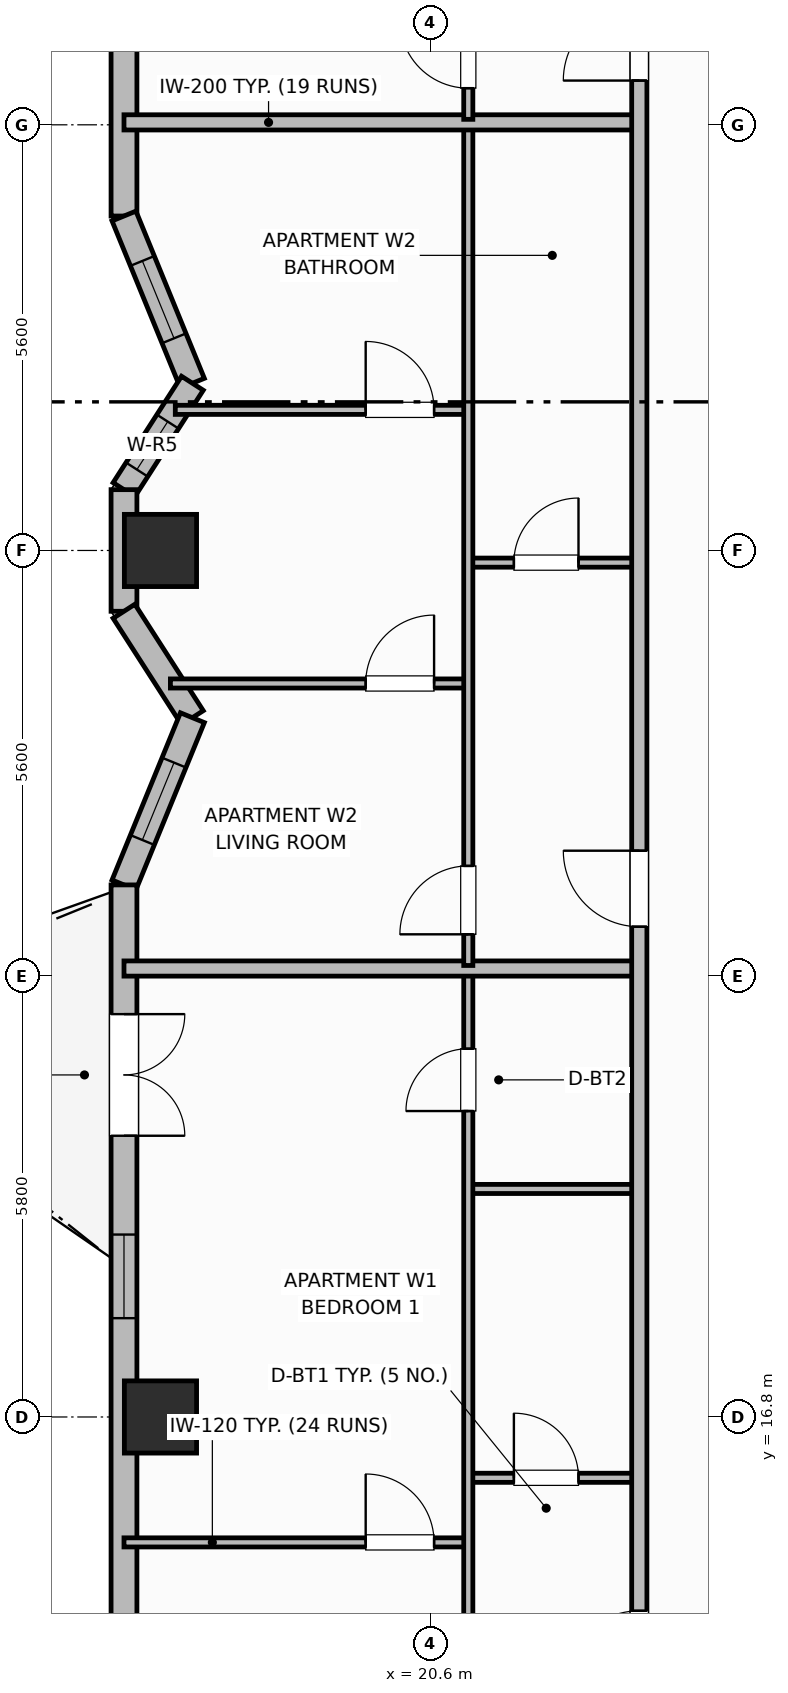
"""IFC4 building model, lengths in metres.
Left out: names, types, materials, properties, quantities, classifications, styles, units other than length and angle.
Written with IfcOpenShell. Run it as: python <this file> out.ifc"""

import sys

from ifc_helpers import new_model, si_unit, direction, frame, frame_2d, origin, origin_2d, place, context, subcontext, project, spatial, rectangle, extrude, element, fill, save


model = new_model("IFC4")
c1 = context("Model", 3, precision=1e-05, world=origin(), true_north=direction((0.0, 1.0)))
c2 = subcontext(c1, "Body", "Model", "MODEL_VIEW")
j1 = project(units=[si_unit("LENGTHUNIT", "METRE"), si_unit("PLANEANGLEUNIT", "RADIAN")], contexts=[c1])
p1 = place(None, origin())
s1 = spatial("IfcSite", under=j1, at=p1, CompositionType="ELEMENT")
p2 = place(p1, origin())
s2 = spatial("IfcBuilding", under=s1, at=p2, CompositionType="ELEMENT")
p3 = place(p2, frame((0.0, 0.0, 155.2)))
s3 = spatial("IfcBuildingStorey", under=s2, at=p3, CompositionType="ELEMENT", Elevation=155.2)
for number, where, z_axis, x_axis in (
    (1, (17.05, 16.8, 0.0), (0.0, 0.0, 1.0), (1.0, 0.0, 0.0)),
    (2, (17.05, 28.2, 0.0), (0.0, 0.0, 1.0), (1.0, 0.0, 0.0)),
):
    element("IfcColumn", number, at=place(p3, frame(where, z_axis=z_axis, x_axis=x_axis)), inside=s3, PredefinedType="COLUMN", context=c2, shape_type="SweptSolid", body=[
        extrude(rectangle(XDim=0.95, YDim=0.95, at=origin_2d()), origin(), (0.0, 0.0, 1.0), 3.7),
    ])
p4 = place(p3, frame((16.57, 45.9, 0.0), z_axis=(0.0, 0.0, 1.0), x_axis=(0.0, -1.0, 0.0)))
e3 = element("IfcWall", 3, at=p4, inside=s3, PredefinedType="SOLIDWALL", context=c2, shape_type="SweptSolid", body=[
    extrude(rectangle(XDim=13.3, YDim=0.34, at=frame_2d((6.65, 0.0))), origin(), (0.0, 0.0, 1.0), 2.72),
])
p5 = place(p4, frame((1.45, 0.0, 0.75)))
e4 = element("IfcOpeningElement", 4, at=p5, cuts=e3, PredefinedType="OPENING", context=c2, shape_type="SweptSolid", body=[
    extrude(rectangle(XDim=1.4, YDim=1.85, at=frame_2d((0.7, 0.925))), frame((0.0, 0.18, 0.0), z_axis=(0.0, -1.0, 0.0), x_axis=(1.0, 0.0, 0.0)), (0.0, 0.0, 1.0), 0.36),
])
p6 = place(p4, frame((4.36, 0.0, 0.71)))
e5 = element("IfcOpeningElement", 5, at=p6, cuts=e3, PredefinedType="OPENING", context=c2, shape_type="SweptSolid", body=[
    extrude(rectangle(XDim=1.4, YDim=1.85, at=frame_2d((0.7, 0.925))), frame((0.0, 0.18, 0.0), z_axis=(0.0, -1.0, 0.0), x_axis=(1.0, 0.0, 0.0)), (0.0, 0.0, 1.0), 0.36),
])
p7 = place(p4, frame((8.5, 0.0, 0.75)))
e6 = element("IfcOpeningElement", 6, at=p7, cuts=e3, PredefinedType="OPENING", context=c2, shape_type="SweptSolid", body=[
    extrude(rectangle(XDim=1.4, YDim=1.85, at=frame_2d((0.7, 0.925))), frame((0.0, 0.18, 0.0), z_axis=(0.0, -1.0, 0.0), x_axis=(1.0, 0.0, 0.0)), (0.0, 0.0, 1.0), 0.36),
])
p8 = place(p3, frame((16.57, 32.6, 0.0), z_axis=(0.0, 0.0, 1.0), x_axis=(0.378568858991, -0.925573130013, 0.0)))
e7 = element("IfcWall", 7, at=p8, inside=s3, PredefinedType="SOLIDWALL", context=c2, shape_type="SweptSolid", body=[
    extrude(rectangle(XDim=2.377, YDim=0.34, at=frame_2d((1.188, 0.0))), origin(), (0.0, 0.0, 1.0), 2.72),
])
p9 = place(p8, frame((0.638, 0.0, 0.91)))
e8 = element("IfcOpeningElement", 8, at=p9, cuts=e7, PredefinedType="OPENING", context=c2, shape_type="SweptSolid", body=[
    extrude(rectangle(XDim=1.1, YDim=1.65, at=frame_2d((0.55, 0.825))), frame((0.0, 0.18, 0.0), z_axis=(0.0, -1.0, 0.0), x_axis=(1.0, 0.0, 0.0)), (0.0, 0.0, 1.0), 0.36),
])
p10 = place(p3, frame((17.47, 30.4, 0.0), z_axis=(0.0, 0.0, 1.0), x_axis=(-0.540742762169, -0.841188008214, 0.0)))
e9 = element("IfcWall", 9, at=p10, inside=s3, PredefinedType="SOLIDWALL", context=c2, shape_type="SweptSolid", body=[
    extrude(rectangle(XDim=1.664, YDim=0.34, at=frame_2d((0.832, 0.0))), origin(), (0.0, 0.0, 1.0), 2.72),
])
p11 = place(p10, frame((0.6, 0.0, 0.91)))
e10 = element("IfcOpeningElement", 10, at=p11, cuts=e9, PredefinedType="OPENING", context=c2, shape_type="SweptSolid", body=[
    extrude(rectangle(XDim=0.75, YDim=1.65, at=frame_2d((0.375, 0.825))), frame((0.0, 0.18, 0.0), z_axis=(0.0, -1.0, 0.0), x_axis=(1.0, 0.0, 0.0)), (0.0, 0.0, 1.0), 0.36),
])
p12 = place(p3, frame((16.57, 29.0, 0.0), z_axis=(0.0, 0.0, 1.0), x_axis=(0.0, -1.0, 0.0)))
e11 = element("IfcWall", 11, at=p12, inside=s3, PredefinedType="SOLIDWALL", context=c2, shape_type="SweptSolid", body=[
    extrude(rectangle(XDim=1.6, YDim=0.34, at=frame_2d((0.8, 0.0))), origin(), (0.0, 0.0, 1.0), 2.72),
])
p13 = place(p3, frame((16.57, 27.4, 0.0), z_axis=(0.0, 0.0, 1.0), x_axis=(0.540742762169, -0.841188008214, 0.0)))
e12 = element("IfcWall", 12, at=p13, inside=s3, PredefinedType="SOLIDWALL", context=c2, shape_type="SweptSolid", body=[
    extrude(rectangle(XDim=1.664, YDim=0.34, at=frame_2d((0.832, 0.0))), origin(), (0.0, 0.0, 1.0), 2.72),
])
p14 = place(p3, frame((17.47, 26.0, 0.0), z_axis=(0.0, 0.0, 1.0), x_axis=(-0.378604849088, -0.925558408879, 0.0)))
e13 = element("IfcWall", 13, at=p14, inside=s3, PredefinedType="SOLIDWALL", context=c2, shape_type="SweptSolid", body=[
    extrude(rectangle(XDim=2.377, YDim=0.34, at=frame_2d((1.188, 0.0))), origin(), (0.0, 0.0, 1.0), 2.72),
])
p15 = place(p14, frame((0.638, 0.0, 0.91)))
e14 = element("IfcOpeningElement", 14, at=p15, cuts=e13, PredefinedType="OPENING", context=c2, shape_type="SweptSolid", body=[
    extrude(rectangle(XDim=1.1, YDim=1.65, at=frame_2d((0.55, 0.825))), frame((0.0, 0.18, 0.0), z_axis=(0.0, -1.0, 0.0), x_axis=(1.0, 0.0, 0.0)), (0.0, 0.0, 1.0), 0.36),
])
p16 = place(p3, frame((16.57, 23.8, 0.0), z_axis=(0.0, 0.0, 1.0), x_axis=(0.0, -1.0, 0.0)))
e15 = element("IfcWall", 15, at=p16, inside=s3, PredefinedType="SOLIDWALL", context=c2, shape_type="SweptSolid", body=[
    extrude(rectangle(XDim=13.3, YDim=0.34, at=frame_2d((6.65, 0.0))), origin(), (0.0, 0.0, 1.0), 2.72),
])
p17 = place(p16, frame((1.7, 0.0, 0.0)))
e16 = element("IfcOpeningElement", 16, at=p17, cuts=e15, PredefinedType="OPENING", context=c2, shape_type="SweptSolid", body=[
    extrude(rectangle(XDim=1.6, YDim=2.1, at=frame_2d((0.8, 1.05))), frame((0.0, 0.18, 0.0), z_axis=(0.0, -1.0, 0.0), x_axis=(1.0, 0.0, 0.0)), (0.0, 0.0, 1.0), 0.36),
])
p18 = place(p16, frame((4.6, 0.0, 0.95)))
e17 = element("IfcOpeningElement", 17, at=p18, cuts=e15, PredefinedType="OPENING", context=c2, shape_type="SweptSolid", body=[
    extrude(rectangle(XDim=1.1, YDim=1.65, at=frame_2d((0.55, 0.825))), frame((0.0, 0.18, 0.0), z_axis=(0.0, -1.0, 0.0), x_axis=(1.0, 0.0, 0.0)), (0.0, 0.0, 1.0), 0.36),
])
p19 = place(p16, frame((10.6, 0.0, 0.95)))
e18 = element("IfcOpeningElement", 18, at=p19, cuts=e15, PredefinedType="OPENING", context=c2, shape_type="SweptSolid", body=[
    extrude(rectangle(XDim=1.1, YDim=1.65, at=frame_2d((0.55, 0.825))), frame((0.0, 0.18, 0.0), z_axis=(0.0, -1.0, 0.0), x_axis=(1.0, 0.0, 0.0)), (0.0, 0.0, 1.0), 0.36),
])
p20 = place(p3, frame((21.1, 16.0, 0.0), z_axis=(0.0, 0.0, 1.0), x_axis=(1.0, 0.0, 0.0)))
e19 = element("IfcWall", 19, at=p20, inside=s3, PredefinedType="PARTITIONING", context=c2, shape_type="SweptSolid", body=[
    extrude(rectangle(XDim=2.25, YDim=0.12, at=frame_2d((1.125, 0.0))), origin(), (0.0, 0.0, 1.0), 2.55),
])
p21 = place(p20, frame((0.6, 0.0, 0.0)))
e20 = element("IfcOpeningElement", 20, at=p21, cuts=e19, PredefinedType="OPENING", context=c2, shape_type="SweptSolid", body=[
    extrude(rectangle(XDim=0.85, YDim=2.1, at=frame_2d((0.425, 1.05))), frame((0.0, 0.07, 0.0), z_axis=(0.0, -1.0, 0.0), x_axis=(1.0, 0.0, 0.0)), (0.0, 0.0, 1.0), 0.14),
])
p22 = place(p3, frame((21.1, 19.8, 0.0), z_axis=(0.0, 0.0, 1.0), x_axis=(1.0, 0.0, 0.0)))
e21 = element("IfcWall", 21, at=p22, inside=s3, PredefinedType="PARTITIONING", context=c2, shape_type="SweptSolid", body=[
    extrude(rectangle(XDim=2.25, YDim=0.12, at=frame_2d((1.125, 0.0))), origin(), (0.0, 0.0, 1.0), 2.55),
])
p23 = place(p3, frame((16.57, 15.15, 0.0), z_axis=(0.0, 0.0, 1.0), x_axis=(1.0, 0.0, 0.0)))
e22 = element("IfcWall", 22, at=p23, inside=s3, PredefinedType="PARTITIONING", context=c2, shape_type="SweptSolid", body=[
    extrude(rectangle(XDim=4.53, YDim=0.12, at=frame_2d((2.265, 0.0))), origin(), (0.0, 0.0, 1.0), 2.55),
])
p24 = place(p23, frame((3.18, 0.0, 0.0)))
e23 = element("IfcOpeningElement", 23, at=p24, cuts=e22, PredefinedType="OPENING", context=c2, shape_type="SweptSolid", body=[
    extrude(rectangle(XDim=0.9, YDim=2.1, at=frame_2d((0.45, 1.05))), frame((0.0, 0.07, 0.0), z_axis=(0.0, -1.0, 0.0), x_axis=(1.0, 0.0, 0.0)), (0.0, 0.0, 1.0), 0.14),
])
p25 = place(p3, frame((21.1, 10.64, 0.0), z_axis=(0.0, 0.0, 1.0), x_axis=(0.0, 1.0, 0.0)))
e24 = element("IfcWall", 24, at=p25, inside=s3, PredefinedType="PARTITIONING", context=c2, shape_type="SweptSolid", body=[
    extrude(rectangle(XDim=12.02, YDim=0.12, at=frame_2d((6.01, 0.0))), origin(), (0.0, 0.0, 1.0), 2.55),
])
p26 = place(p25, frame((0.41, 0.0, 0.0)))
e25 = element("IfcOpeningElement", 25, at=p26, cuts=e24, PredefinedType="OPENING", context=c2, shape_type="SweptSolid", body=[
    extrude(rectangle(XDim=0.9, YDim=2.1, at=frame_2d((0.45, 1.05))), frame((0.0, 0.07, 0.0), z_axis=(0.0, -1.0, 0.0), x_axis=(1.0, 0.0, 0.0)), (0.0, 0.0, 1.0), 0.14),
])
p27 = place(p25, frame((10.185, 0.0, 0.0)))
e26 = element("IfcOpeningElement", 26, at=p27, cuts=e24, PredefinedType="OPENING", context=c2, shape_type="SweptSolid", body=[
    extrude(rectangle(XDim=0.82, YDim=2.08, at=frame_2d((0.41, 1.04))), frame((0.0, 0.07, 0.0), z_axis=(0.0, -1.0, 0.0), x_axis=(1.0, 0.0, 0.0)), (0.0, 0.0, 1.0), 0.14),
])
p28 = place(p3, frame((16.57, 22.7, 0.0), z_axis=(0.0, 0.0, 1.0), x_axis=(1.0, 0.0, 0.0)))
e27 = element("IfcWall", 27, at=p28, inside=s3, PredefinedType="PARTITIONING", context=c2, shape_type="SweptSolid", body=[
    extrude(rectangle(XDim=6.78, YDim=0.2, at=frame_2d((3.39, 0.0))), origin(), (0.0, 0.0, 1.0), 2.55),
])
p29 = place(p3, frame((21.1, 28.04, 0.0), z_axis=(0.0, 0.0, 1.0), x_axis=(1.0, 0.0, 0.0)))
e28 = element("IfcWall", 28, at=p29, inside=s3, PredefinedType="PARTITIONING", context=c2, shape_type="SweptSolid", body=[
    extrude(rectangle(XDim=2.25, YDim=0.12, at=frame_2d((1.125, 0.0))), origin(), (0.0, 0.0, 1.0), 2.55),
])
p30 = place(p29, frame((0.6, 0.0, 0.0)))
e29 = element("IfcOpeningElement", 29, at=p30, cuts=e28, PredefinedType="OPENING", context=c2, shape_type="SweptSolid", body=[
    extrude(rectangle(XDim=0.85, YDim=2.1, at=frame_2d((0.425, 1.05))), frame((0.0, 0.07, 0.0), z_axis=(0.0, -1.0, 0.0), x_axis=(1.0, 0.0, 0.0)), (0.0, 0.0, 1.0), 0.14),
])
p31 = place(p3, frame((17.181, 26.45, 0.0), z_axis=(0.0, 0.0, 1.0), x_axis=(1.0, 0.0, 0.0)))
e30 = element("IfcWall", 30, at=p31, inside=s3, PredefinedType="PARTITIONING", context=c2, shape_type="SweptSolid", body=[
    extrude(rectangle(XDim=3.919, YDim=0.12, at=frame_2d((1.96, 0.0))), origin(), (0.0, 0.0, 1.0), 2.55),
])
p32 = place(p31, frame((2.569, 0.0, 0.0)))
e31 = element("IfcOpeningElement", 31, at=p32, cuts=e30, PredefinedType="OPENING", context=c2, shape_type="SweptSolid", body=[
    extrude(rectangle(XDim=0.9, YDim=2.1, at=frame_2d((0.45, 1.05))), frame((0.0, 0.07, 0.0), z_axis=(0.0, -1.0, 0.0), x_axis=(1.0, 0.0, 0.0)), (0.0, 0.0, 1.0), 0.14),
])
p33 = place(p3, frame((17.245, 30.05, 0.0), z_axis=(0.0, 0.0, 1.0), x_axis=(1.0, 0.0, 0.0)))
e32 = element("IfcWall", 32, at=p33, inside=s3, PredefinedType="PARTITIONING", context=c2, shape_type="SweptSolid", body=[
    extrude(rectangle(XDim=3.855, YDim=0.12, at=frame_2d((1.927, 0.0))), origin(), (0.0, 0.0, 1.0), 2.55),
])
p34 = place(p33, frame((2.505, 0.0, 0.0)))
e33 = element("IfcOpeningElement", 33, at=p34, cuts=e32, PredefinedType="OPENING", context=c2, shape_type="SweptSolid", body=[
    extrude(rectangle(XDim=0.9, YDim=2.1, at=frame_2d((0.45, 1.05))), frame((0.0, 0.07, 0.0), z_axis=(0.0, -1.0, 0.0), x_axis=(1.0, 0.0, 0.0)), (0.0, 0.0, 1.0), 0.14),
])
p35 = place(p3, frame((21.1, 22.74, 0.0), z_axis=(0.0, 0.0, 1.0), x_axis=(0.0, 1.0, 0.0)))
e34 = element("IfcWall", 34, at=p35, inside=s3, PredefinedType="PARTITIONING", context=c2, shape_type="SweptSolid", body=[
    extrude(rectangle(XDim=11.052, YDim=0.12, at=frame_2d((5.526, 0.0))), origin(), (0.0, 0.0, 1.0), 2.55),
])
p36 = place(p35, frame((0.41, 0.0, 0.0)))
e35 = element("IfcOpeningElement", 35, at=p36, cuts=e34, PredefinedType="OPENING", context=c2, shape_type="SweptSolid", body=[
    extrude(rectangle(XDim=0.9, YDim=2.1, at=frame_2d((0.45, 1.05))), frame((0.0, 0.07, 0.0), z_axis=(0.0, -1.0, 0.0), x_axis=(1.0, 0.0, 0.0)), (0.0, 0.0, 1.0), 0.14),
])
p37 = place(p3, frame((16.57, 33.832, 0.0), z_axis=(0.0, 0.0, 1.0), x_axis=(1.0, 0.0, 0.0)))
e36 = element("IfcWall", 36, at=p37, inside=s3, PredefinedType="PARTITIONING", context=c2, shape_type="SweptSolid", body=[
    extrude(rectangle(XDim=6.78, YDim=0.2, at=frame_2d((3.39, 0.0))), origin(), (0.0, 0.0, 1.0), 2.55),
])
p38 = place(p3, frame((21.1, 33.872, 0.0), z_axis=(0.0, 0.0, 1.0), x_axis=(0.0, 1.0, 0.0)))
e37 = element("IfcWall", 37, at=p38, inside=s3, PredefinedType="PARTITIONING", context=c2, shape_type="SweptSolid", body=[
    extrude(rectangle(XDim=11.888, YDim=0.12, at=frame_2d((5.944, 0.0))), origin(), (0.0, 0.0, 1.0), 2.55),
])
p39 = place(p38, frame((0.41, 0.0, 0.0)))
e38 = element("IfcOpeningElement", 38, at=p39, cuts=e37, PredefinedType="OPENING", context=c2, shape_type="SweptSolid", body=[
    extrude(rectangle(XDim=0.9, YDim=2.1, at=frame_2d((0.45, 1.05))), frame((0.0, 0.07, 0.0), z_axis=(0.0, -1.0, 0.0), x_axis=(1.0, 0.0, 0.0)), (0.0, 0.0, 1.0), 0.14),
])
p40 = place(p38, frame((10.119, 0.0, 0.0)))
e39 = element("IfcOpeningElement", 39, at=p40, cuts=e37, PredefinedType="OPENING", context=c2, shape_type="SweptSolid", body=[
    extrude(rectangle(XDim=0.82, YDim=2.08, at=frame_2d((0.41, 1.04))), frame((0.0, 0.07, 0.0), z_axis=(0.0, -1.0, 0.0), x_axis=(1.0, 0.0, 0.0)), (0.0, 0.0, 1.0), 0.14),
])
p41 = place(p3, frame((23.35, 10.6, 0.0), z_axis=(0.0, 0.0, 1.0), x_axis=(0.0, 1.0, 0.0)))
e40 = element("IfcWall", 40, at=p41, inside=s3, PredefinedType="PARTITIONING", context=c2, shape_type="SweptSolid", body=[
    extrude(rectangle(XDim=35.2, YDim=0.2, at=frame_2d((17.6, 0.0))), origin(), (0.0, 0.0, 1.0), 2.55),
])
p42 = place(p41, frame((2.65, 0.0, 0.0)))
e41 = element("IfcOpeningElement", 41, at=p42, cuts=e40, PredefinedType="OPENING", context=c2, shape_type="SweptSolid", body=[
    extrude(rectangle(XDim=1.0, YDim=2.15, at=frame_2d((0.5, 1.075))), frame((0.0, 0.11, 0.0), z_axis=(0.0, -1.0, 0.0), x_axis=(1.0, 0.0, 0.0)), (0.0, 0.0, 1.0), 0.22),
])
p43 = place(p41, frame((12.65, 0.0, 0.0)))
e42 = element("IfcOpeningElement", 42, at=p43, cuts=e40, PredefinedType="OPENING", context=c2, shape_type="SweptSolid", body=[
    extrude(rectangle(XDim=1.0, YDim=2.15, at=frame_2d((0.5, 1.075))), frame((0.0, 0.11, 0.0), z_axis=(0.0, -1.0, 0.0), x_axis=(1.0, 0.0, 0.0)), (0.0, 0.0, 1.0), 0.22),
])
p44 = place(p41, frame((23.782, 0.0, 0.0)))
e43 = element("IfcOpeningElement", 43, at=p44, cuts=e40, PredefinedType="OPENING", context=c2, shape_type="SweptSolid", body=[
    extrude(rectangle(XDim=1.0, YDim=2.15, at=frame_2d((0.5, 1.075))), frame((0.0, 0.11, 0.0), z_axis=(0.0, -1.0, 0.0), x_axis=(1.0, 0.0, 0.0)), (0.0, 0.0, 1.0), 0.22),
])
p45 = place(p9, origin())
e44 = element("IfcWindow", 44, at=p45, inside=s3, PartitioningType="SINGLE_PANEL", PredefinedType="WINDOW", context=c2, shape_type="SweptSolid", body=[
    extrude(rectangle(XDim=1.1, YDim=1.65, at=frame_2d((0.55, 0.825))), frame((0.0, 0.03, 0.0), z_axis=(0.0, -1.0, 0.0), x_axis=(1.0, 0.0, 0.0)), (0.0, 0.0, 1.0), 0.06),
])
fill(e8, e44)
p46 = place(p11, origin())
e45 = element("IfcWindow", 45, at=p46, inside=s3, PartitioningType="SINGLE_PANEL", PredefinedType="WINDOW", context=c2, shape_type="SweptSolid", body=[
    extrude(rectangle(XDim=0.75, YDim=1.65, at=frame_2d((0.375, 0.825))), frame((0.0, 0.03, 0.0), z_axis=(0.0, -1.0, 0.0), x_axis=(1.0, 0.0, 0.0)), (0.0, 0.0, 1.0), 0.06),
])
fill(e10, e45)
p47 = place(p15, origin())
e46 = element("IfcWindow", 46, at=p47, inside=s3, PartitioningType="SINGLE_PANEL", PredefinedType="WINDOW", context=c2, shape_type="SweptSolid", body=[
    extrude(rectangle(XDim=1.1, YDim=1.65, at=frame_2d((0.55, 0.825))), frame((0.0, 0.03, 0.0), z_axis=(0.0, -1.0, 0.0), x_axis=(1.0, 0.0, 0.0)), (0.0, 0.0, 1.0), 0.06),
])
fill(e14, e46)
p48 = place(p17, origin())
e47 = element("IfcDoor", 47, at=p48, inside=s3, OperationType="DOUBLE_DOOR_SINGLE_SWING", PredefinedType="DOOR", context=c2, shape_type="SweptSolid", body=[
    extrude(rectangle(XDim=1.6, YDim=2.1, at=frame_2d((0.8, 1.05))), frame((0.0, 0.025, 0.0), z_axis=(0.0, -1.0, 0.0), x_axis=(1.0, 0.0, 0.0)), (0.0, 0.0, 1.0), 0.05),
])
fill(e16, e47)
p49 = place(p18, origin())
e48 = element("IfcWindow", 48, at=p49, inside=s3, PartitioningType="SINGLE_PANEL", PredefinedType="WINDOW", context=c2, shape_type="SweptSolid", body=[
    extrude(rectangle(XDim=1.1, YDim=1.65, at=frame_2d((0.55, 0.825))), frame((0.0, 0.03, 0.0), z_axis=(0.0, -1.0, 0.0), x_axis=(1.0, 0.0, 0.0)), (0.0, 0.0, 1.0), 0.06),
])
fill(e17, e48)
p50 = place(p21, origin())
e49 = element("IfcDoor", 49, at=p50, inside=s3, OperationType="SINGLE_SWING_LEFT", PredefinedType="DOOR", context=c2, shape_type="SweptSolid", body=[
    extrude(rectangle(XDim=0.85, YDim=2.1, at=frame_2d((0.425, 1.05))), frame((0.0, 0.025, 0.0), z_axis=(0.0, -1.0, 0.0), x_axis=(1.0, 0.0, 0.0)), (0.0, 0.0, 1.0), 0.05),
])
fill(e20, e49)
p51 = place(p24, origin())
e50 = element("IfcDoor", 50, at=p51, inside=s3, OperationType="SINGLE_SWING_LEFT", PredefinedType="DOOR", context=c2, shape_type="SweptSolid", body=[
    extrude(rectangle(XDim=0.9, YDim=2.1, at=frame_2d((0.45, 1.05))), frame((0.0, 0.025, 0.0), z_axis=(0.0, -1.0, 0.0), x_axis=(1.0, 0.0, 0.0)), (0.0, 0.0, 1.0), 0.05),
])
fill(e23, e50)
p52 = place(p27, origin())
e51 = element("IfcDoor", 51, at=p52, inside=s3, OperationType="SINGLE_SWING_LEFT", PredefinedType="DOOR", context=c2, shape_type="SweptSolid", body=[
    extrude(rectangle(XDim=0.82, YDim=2.08, at=frame_2d((0.41, 1.04))), frame((0.0, 0.025, 0.0), z_axis=(0.0, -1.0, 0.0), x_axis=(1.0, 0.0, 0.0)), (0.0, 0.0, 1.0), 0.05),
])
fill(e26, e51)
p53 = place(p30, origin())
e52 = element("IfcDoor", 52, at=p53, inside=s3, OperationType="SINGLE_SWING_RIGHT", PredefinedType="DOOR", context=c2, shape_type="SweptSolid", body=[
    extrude(rectangle(XDim=0.85, YDim=2.1, at=frame_2d((0.425, 1.05))), frame((0.0, 0.025, 0.0), z_axis=(0.0, -1.0, 0.0), x_axis=(1.0, 0.0, 0.0)), (0.0, 0.0, 1.0), 0.05),
])
fill(e29, e52)
p54 = place(p32, origin())
e53 = element("IfcDoor", 53, at=p54, inside=s3, OperationType="SINGLE_SWING_RIGHT", PredefinedType="DOOR", context=c2, shape_type="SweptSolid", body=[
    extrude(rectangle(XDim=0.9, YDim=2.1, at=frame_2d((0.45, 1.05))), frame((0.0, 0.025, 0.0), z_axis=(0.0, -1.0, 0.0), x_axis=(1.0, 0.0, 0.0)), (0.0, 0.0, 1.0), 0.05),
])
fill(e31, e53)
p55 = place(p34, origin())
e54 = element("IfcDoor", 54, at=p55, inside=s3, OperationType="SINGLE_SWING_LEFT", PredefinedType="DOOR", context=c2, shape_type="SweptSolid", body=[
    extrude(rectangle(XDim=0.9, YDim=2.1, at=frame_2d((0.45, 1.05))), frame((0.0, 0.025, 0.0), z_axis=(0.0, -1.0, 0.0), x_axis=(1.0, 0.0, 0.0)), (0.0, 0.0, 1.0), 0.05),
])
fill(e33, e54)
p56 = place(p36, origin())
e55 = element("IfcDoor", 55, at=p56, inside=s3, OperationType="SINGLE_SWING_LEFT", PredefinedType="DOOR", context=c2, shape_type="SweptSolid", body=[
    extrude(rectangle(XDim=0.9, YDim=2.1, at=frame_2d((0.45, 1.05))), frame((0.0, 0.025, 0.0), z_axis=(0.0, -1.0, 0.0), x_axis=(1.0, 0.0, 0.0)), (0.0, 0.0, 1.0), 0.05),
])
fill(e35, e55)
p57 = place(p39, origin())
e56 = element("IfcDoor", 56, at=p57, inside=s3, OperationType="SINGLE_SWING_RIGHT", PredefinedType="DOOR", context=c2, shape_type="SweptSolid", body=[
    extrude(rectangle(XDim=0.9, YDim=2.1, at=frame_2d((0.45, 1.05))), frame((0.0, 0.025, 0.0), z_axis=(0.0, -1.0, 0.0), x_axis=(1.0, 0.0, 0.0)), (0.0, 0.0, 1.0), 0.05),
])
fill(e38, e56)
p58 = place(p42, origin())
e57 = element("IfcDoor", 57, at=p58, inside=s3, OperationType="SINGLE_SWING_LEFT", PredefinedType="DOOR", context=c2, shape_type="SweptSolid", body=[
    extrude(rectangle(XDim=1.0, YDim=2.15, at=frame_2d((0.5, 1.075))), frame((0.0, 0.025, 0.0), z_axis=(0.0, -1.0, 0.0), x_axis=(1.0, 0.0, 0.0)), (0.0, 0.0, 1.0), 0.05),
])
fill(e41, e57)
p59 = place(p43, origin())
e58 = element("IfcDoor", 58, at=p59, inside=s3, OperationType="SINGLE_SWING_RIGHT", PredefinedType="DOOR", context=c2, shape_type="SweptSolid", body=[
    extrude(rectangle(XDim=1.0, YDim=2.15, at=frame_2d((0.5, 1.075))), frame((0.0, 0.025, 0.0), z_axis=(0.0, -1.0, 0.0), x_axis=(1.0, 0.0, 0.0)), (0.0, 0.0, 1.0), 0.05),
])
fill(e42, e58)
p60 = place(p44, origin())
e59 = element("IfcDoor", 59, at=p60, inside=s3, OperationType="SINGLE_SWING_LEFT", PredefinedType="DOOR", context=c2, shape_type="SweptSolid", body=[
    extrude(rectangle(XDim=1.0, YDim=2.15, at=frame_2d((0.5, 1.075))), frame((0.0, 0.025, 0.0), z_axis=(0.0, -1.0, 0.0), x_axis=(1.0, 0.0, 0.0)), (0.0, 0.0, 1.0), 0.05),
])
fill(e43, e59)
save(model, sys.argv[1])
